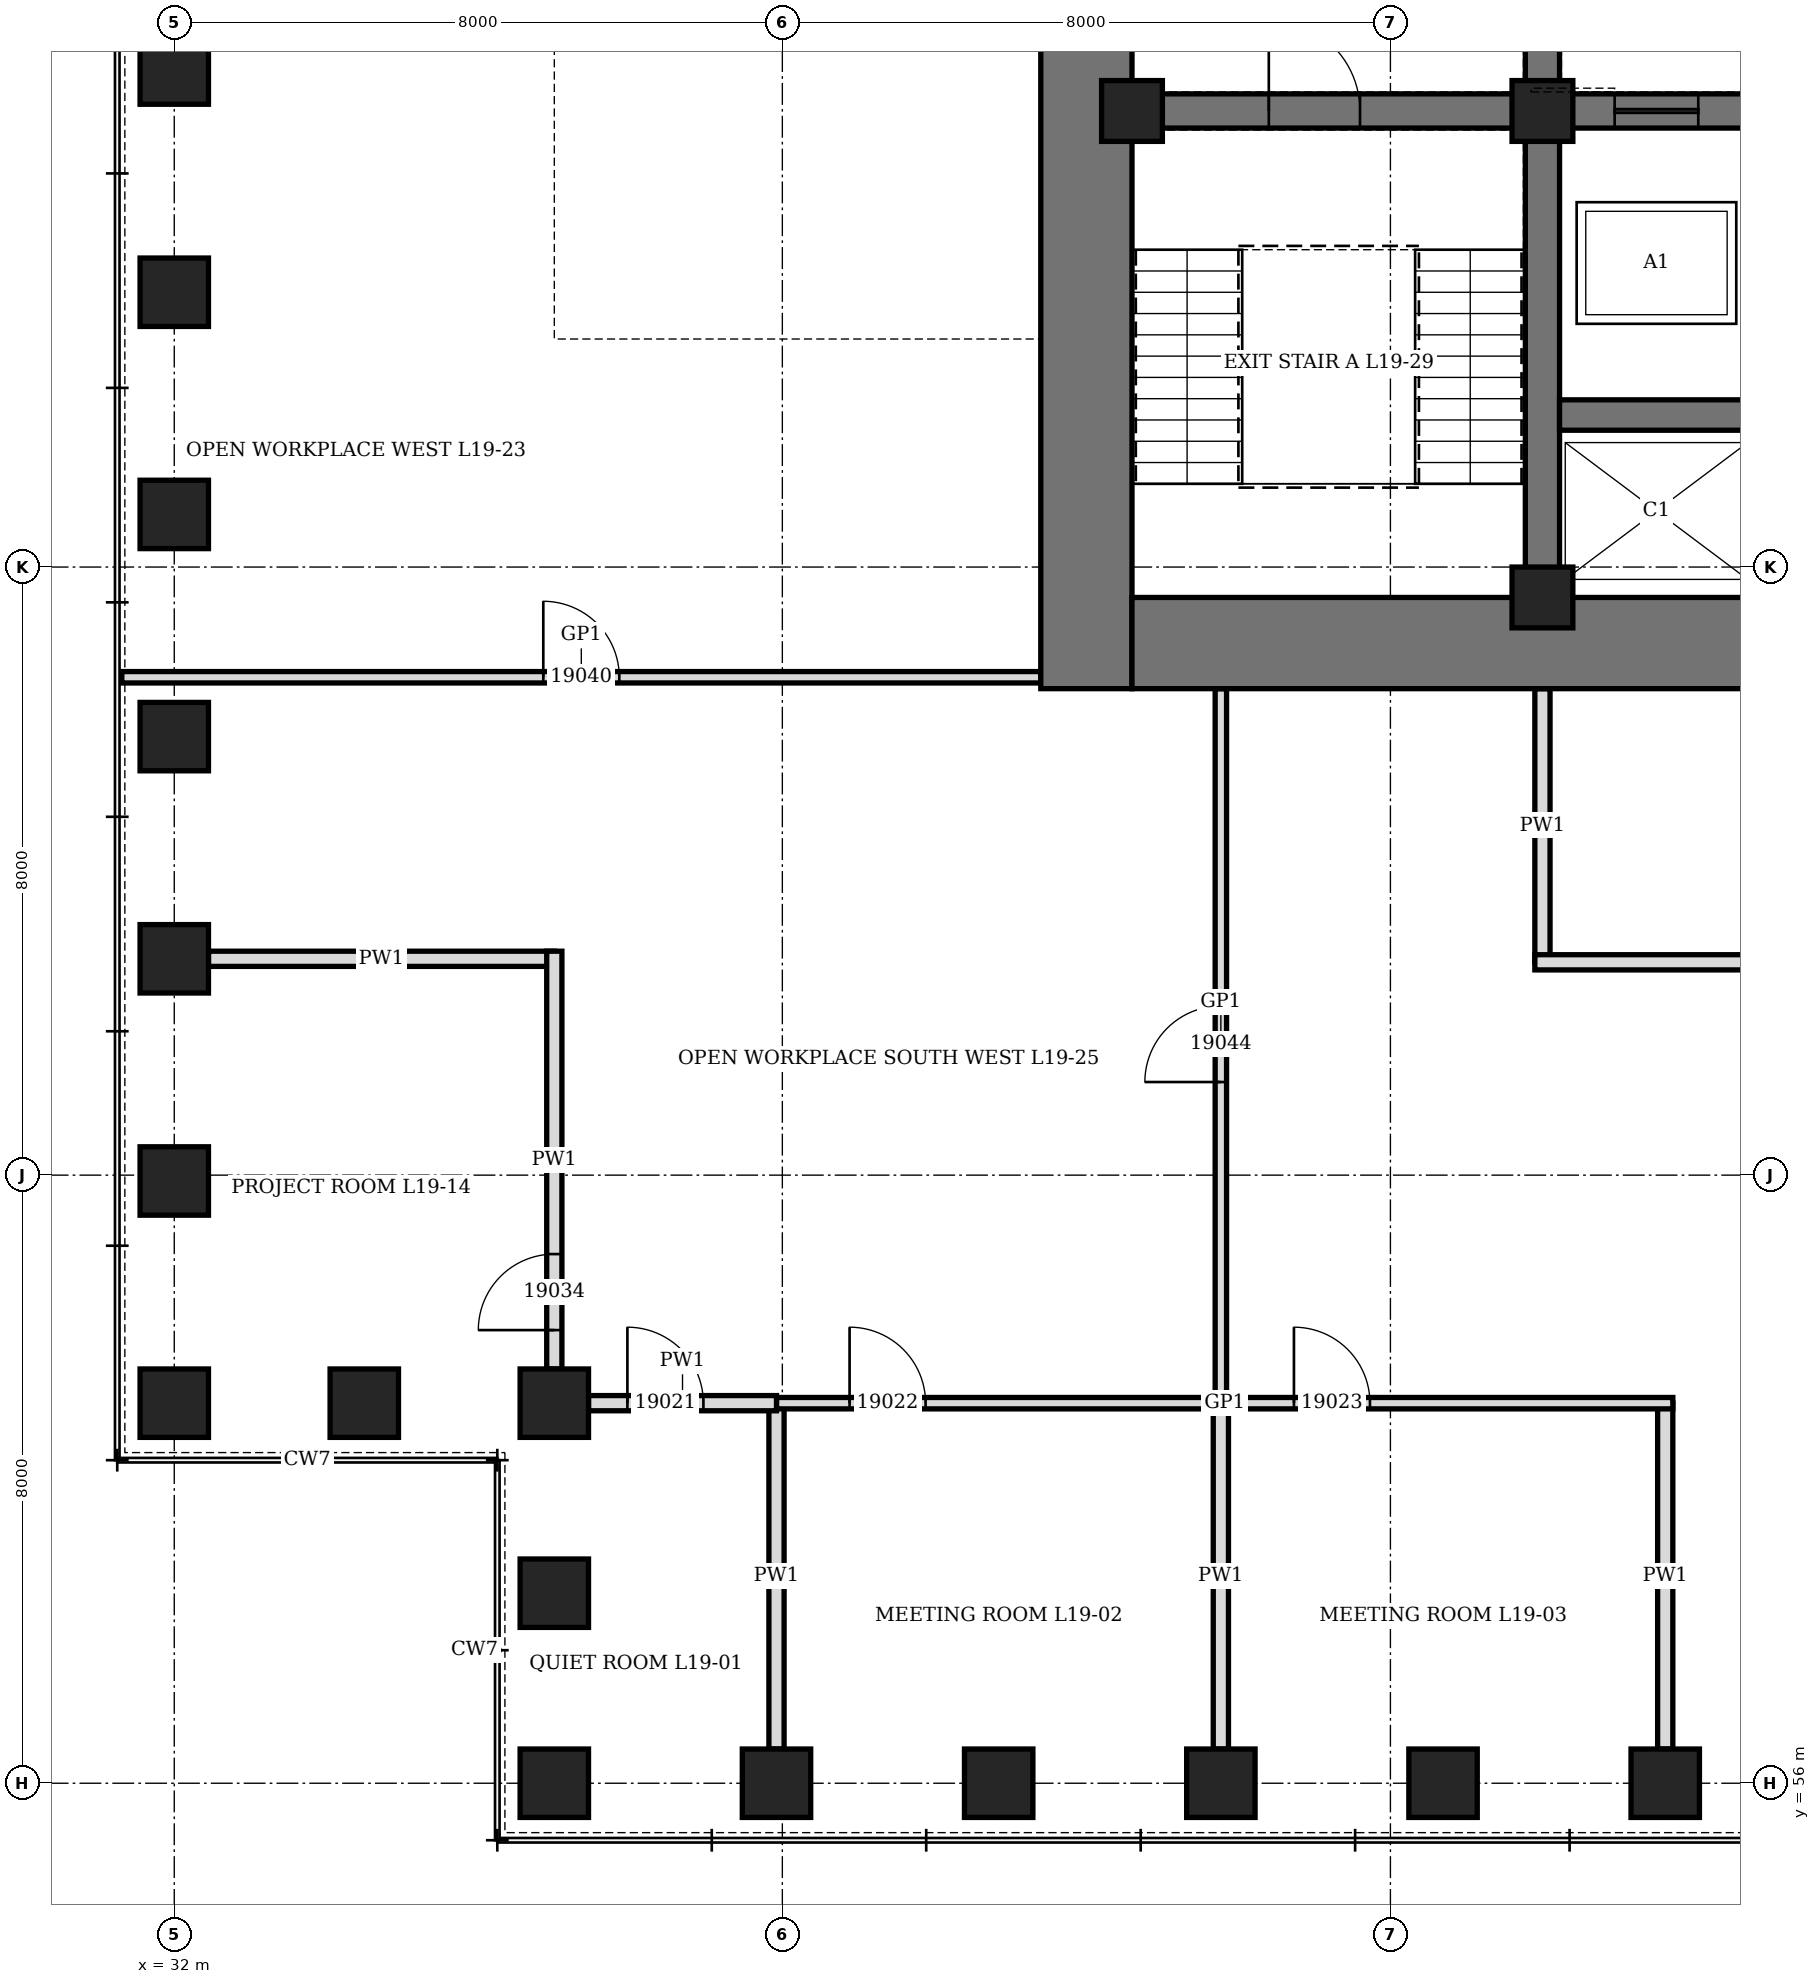
"""IFC4 building model, lengths in metres.
Left out: names, types, materials, properties, quantities, classifications, styles, units other than length and angle.
Written with IfcOpenShell. Run it as: python <this file> out.ifc"""

import sys

from ifc_helpers import new_model, si_unit, direction, frame, frame_2d, origin, origin_2d, place, context, subcontext, project, spatial, rectangle, hollow_rectangle, extrude, element, fill, save


model = new_model("IFC4")
c1 = context("Model", 3, precision=1e-05, world=origin(), true_north=direction((0.0, 1.0)))
c2 = subcontext(c1, "Body", "Model", "MODEL_VIEW")
j1 = project(units=[si_unit("LENGTHUNIT", "METRE"), si_unit("PLANEANGLEUNIT", "RADIAN")], contexts=[c1])
p1 = place(None, origin())
s1 = spatial("IfcSite", under=j1, at=p1, CompositionType="ELEMENT")
p2 = place(p1, origin())
s2 = spatial("IfcBuilding", under=s1, at=p2, CompositionType="ELEMENT")
p3 = place(p2, frame((0.0, 0.0, 89.5)))
s3 = spatial("IfcBuildingStorey", under=s2, at=p3, CompositionType="ELEMENT", Elevation=89.5)
for number, where, z_axis, x_axis in (
    (1, (37.0, 56.0, 0.0), (0.0, 0.0, 1.0), (1.0, 0.0, 0.0)),
    (2, (39.923, 56.0, 0.0), (0.0, 0.0, 1.0), (1.0, 0.0, 0.0)),
    (3, (42.846, 56.0, 0.0), (0.0, 0.0, 1.0), (1.0, 0.0, 0.0)),
    (4, (45.769, 56.0, 0.0), (0.0, 0.0, 1.0), (1.0, 0.0, 0.0)),
    (5, (48.692, 56.0, 0.0), (0.0, 0.0, 1.0), (1.0, 0.0, 0.0)),
    (6, (51.615, 56.0, 0.0), (0.0, 0.0, 1.0), (1.0, 0.0, 0.0)),
    (7, (32.0, 78.539, 0.0), (0.0, 0.0, 1.0), (0.0, 1.0, 0.0)),
    (8, (32.0, 75.615, 0.0), (0.0, 0.0, 1.0), (0.0, 1.0, 0.0)),
    (9, (32.0, 72.692, 0.0), (0.0, 0.0, 1.0), (0.0, 1.0, 0.0)),
    (10, (32.0, 69.769, 0.0), (0.0, 0.0, 1.0), (0.0, 1.0, 0.0)),
    (11, (32.0, 66.846, 0.0), (0.0, 0.0, 1.0), (0.0, 1.0, 0.0)),
    (12, (32.0, 63.923, 0.0), (0.0, 0.0, 1.0), (0.0, 1.0, 0.0)),
    (13, (32.0, 61.0, 0.0), (0.0, 0.0, 1.0), (1.0, 0.0, 0.0)),
    (14, (34.5, 61.0, 0.0), (0.0, 0.0, 1.0), (1.0, 0.0, 0.0)),
    (15, (37.0, 61.0, 0.0), (0.0, 0.0, 1.0), (0.0, 1.0, 0.0)),
    (16, (37.0, 58.5, 0.0), (0.0, 0.0, 1.0), (0.0, 1.0, 0.0)),
):
    element("IfcColumn", number, at=place(p3, frame(where, z_axis=z_axis, x_axis=x_axis)), inside=s3, PredefinedType="COLUMN", context=c2, shape_type="SweptSolid", body=[
        extrude(hollow_rectangle(XDim=0.9, YDim=0.9, WallThickness=0.12, at=origin_2d()), origin(), (0.0, 0.0, 1.0), 4.2),
    ])
p4 = place(p3, frame((44.0, 70.4, 0.0), z_axis=(0.0, 0.0, 1.0), x_axis=(0.0, 1.0, 0.0)))
e17 = element("IfcWall", 17, at=p4, inside=s3, PredefinedType="SHEAR", context=c2, shape_type="SweptSolid", body=[
    extrude(rectangle(XDim=19.2, YDim=1.2, at=frame_2d((9.6, 0.0))), origin(), (0.0, 0.0, 1.0), 4.2),
])
p5 = place(p4, frame((8.6, 0.0, 0.0)))
e18 = element("IfcOpeningElement", 18, at=p5, cuts=e17, PredefinedType="OPENING", context=c2, shape_type="SweptSolid", body=[
    extrude(rectangle(XDim=2.0, YDim=2.4, at=frame_2d((1.0, 1.2))), frame((0.0, 0.61, 0.0), z_axis=(0.0, -1.0, 0.0), x_axis=(1.0, 0.0, 0.0)), (0.0, 0.0, 1.0), 1.22),
])
p6 = place(p3, frame((44.6, 71.0, 0.0), z_axis=(0.0, 0.0, 1.0), x_axis=(1.0, 0.0, 0.0)))
e19 = element("IfcWall", 19, at=p6, inside=s3, PredefinedType="SHEAR", context=c2, shape_type="SweptSolid", body=[
    extrude(rectangle(XDim=22.8, YDim=1.2, at=frame_2d((11.4, 0.0))), origin(), (0.0, 0.0, 1.0), 4.2),
])
p7 = place(p3, frame((50.0, 71.6, 0.0), z_axis=(0.0, 0.0, 1.0), x_axis=(0.0, 1.0, 0.0)))
e20 = element("IfcWall", 20, at=p7, inside=s3, PredefinedType="SHEAR", context=c2, shape_type="SweptSolid", body=[
    extrude(rectangle(XDim=16.8, YDim=0.45, at=frame_2d((8.4, 0.0))), origin(), (0.0, 0.0, 1.0), 4.2),
])
p8 = place(p7, frame((7.5, 0.0, 0.0)))
e21 = element("IfcOpeningElement", 21, at=p8, cuts=e20, PredefinedType="OPENING", context=c2, shape_type="SweptSolid", body=[
    extrude(rectangle(XDim=1.8, YDim=2.4, at=frame_2d((0.9, 1.2))), frame((0.0, 0.235, 0.0), z_axis=(0.0, -1.0, 0.0), x_axis=(1.0, 0.0, 0.0)), (0.0, 0.0, 1.0), 0.47),
])
p9 = place(p3, frame((44.6, 78.0, 0.0), z_axis=(0.0, 0.0, 1.0), x_axis=(1.0, 0.0, 0.0)))
e22 = element("IfcWall", 22, at=p9, inside=s3, PredefinedType="SHEAR", context=c2, shape_type="SweptSolid", body=[
    extrude(rectangle(XDim=5.175, YDim=0.45, at=frame_2d((2.587, 0.0))), origin(), (0.0, 0.0, 1.0), 4.2),
])
p10 = place(p9, frame((1.8, 0.0, 0.0)))
e23 = element("IfcOpeningElement", 23, at=p10, cuts=e22, PredefinedType="OPENING", context=c2, shape_type="SweptSolid", body=[
    extrude(rectangle(XDim=1.2, YDim=2.1, at=frame_2d((0.6, 1.05))), frame((0.0, 0.235, 0.0), z_axis=(0.0, -1.0, 0.0), x_axis=(1.0, 0.0, 0.0)), (0.0, 0.0, 1.0), 0.47),
])
p11 = place(p3, frame((50.225, 78.0, 0.0), z_axis=(0.0, 0.0, 1.0), x_axis=(1.0, 0.0, 0.0)))
e24 = element("IfcWall", 24, at=p11, inside=s3, PredefinedType="SHEAR", context=c2, shape_type="SweptSolid", body=[
    extrude(rectangle(XDim=11.55, YDim=0.45, at=frame_2d((5.775, 0.0))), origin(), (0.0, 0.0, 1.0), 4.2),
])
p12 = place(p11, frame((0.725, 0.0, 0.0)))
e25 = element("IfcOpeningElement", 25, at=p12, cuts=e24, PredefinedType="OPENING", context=c2, shape_type="SweptSolid", body=[
    extrude(rectangle(XDim=1.1, YDim=2.2, at=frame_2d((0.55, 1.1))), frame((0.0, 0.235, 0.0), z_axis=(0.0, -1.0, 0.0), x_axis=(1.0, 0.0, 0.0)), (0.0, 0.0, 1.0), 0.47),
])
p13 = place(p11, frame((3.725, 0.0, 0.0)))
e26 = element("IfcOpeningElement", 26, at=p13, cuts=e24, PredefinedType="OPENING", context=c2, shape_type="SweptSolid", body=[
    extrude(rectangle(XDim=1.1, YDim=2.2, at=frame_2d((0.55, 1.1))), frame((0.0, 0.235, 0.0), z_axis=(0.0, -1.0, 0.0), x_axis=(1.0, 0.0, 0.0)), (0.0, 0.0, 1.0), 0.47),
])
p14 = place(p11, frame((6.725, 0.0, 0.0)))
e27 = element("IfcOpeningElement", 27, at=p14, cuts=e24, PredefinedType="OPENING", context=c2, shape_type="SweptSolid", body=[
    extrude(rectangle(XDim=1.1, YDim=2.2, at=frame_2d((0.55, 1.1))), frame((0.0, 0.235, 0.0), z_axis=(0.0, -1.0, 0.0), x_axis=(1.0, 0.0, 0.0)), (0.0, 0.0, 1.0), 0.47),
])
p15 = place(p11, frame((9.725, 0.0, 0.0)))
e28 = element("IfcOpeningElement", 28, at=p15, cuts=e24, PredefinedType="OPENING", context=c2, shape_type="SweptSolid", body=[
    extrude(rectangle(XDim=1.1, YDim=2.2, at=frame_2d((0.55, 1.1))), frame((0.0, 0.235, 0.0), z_axis=(0.0, -1.0, 0.0), x_axis=(1.0, 0.0, 0.0)), (0.0, 0.0, 1.0), 0.47),
])
p16 = place(p3, frame((50.225, 74.0, 0.0), z_axis=(0.0, 0.0, 1.0), x_axis=(1.0, 0.0, 0.0)))
e29 = element("IfcWall", 29, at=p16, inside=s3, PredefinedType="SHEAR", context=c2, shape_type="SweptSolid", body=[
    extrude(rectangle(XDim=11.55, YDim=0.4, at=frame_2d((5.775, 0.0))), origin(), (0.0, 0.0, 1.0), 4.2),
])
for number, where, z_axis, x_axis in (
    (30, (44.6, 78.0, 0.0), (0.0, 0.0, 1.0), (1.0, 0.0, 0.0)),
    (31, (50.0, 71.6, 0.0), (0.0, 0.0, 1.0), (1.0, 0.0, 0.0)),
    (32, (50.0, 78.0, 0.0), (0.0, 0.0, 1.0), (1.0, 0.0, 0.0)),
):
    element("IfcColumn", number, at=place(p3, frame(where, z_axis=z_axis, x_axis=x_axis)), inside=s3, PredefinedType="COLUMN", context=c2, shape_type="SweptSolid", body=[
        extrude(hollow_rectangle(XDim=0.8, YDim=0.8, WallThickness=0.1, at=origin_2d()), origin(), (0.0, 0.0, 1.0), 4.2),
    ])
p17 = place(p3, frame((39.923, 56.45, 0.0), z_axis=(0.0, 0.0, 1.0), x_axis=(0.0, 1.0, 0.0)))
e33 = element("IfcWall", 33, at=p17, inside=s3, PredefinedType="PARTITIONING", context=c2, shape_type="SweptSolid", body=[
    extrude(rectangle(XDim=4.55, YDim=0.2, at=frame_2d((2.275, 0.0))), origin(), (0.0, 0.0, 1.0), 3.428),
])
for number, where, z_axis, x_axis in (
    (34, (45.769, 56.45, 0.0), (0.0, 0.0, 1.0), (0.0, 1.0, 0.0)),
    (35, (51.615, 56.45, 0.0), (0.0, 0.0, 1.0), (0.0, 1.0, 0.0)),
):
    element("IfcWall", number, at=place(p3, frame(where, z_axis=z_axis, x_axis=x_axis)), inside=s3, PredefinedType="PARTITIONING", context=c2, shape_type="SweptSolid", body=[
        extrude(rectangle(XDim=4.55, YDim=0.2, at=frame_2d((2.275, 0.0))), origin(), (0.0, 0.0, 1.0), 3.278),
    ])
p18 = place(p3, frame((32.45, 66.846, 0.0), z_axis=(0.0, 0.0, 1.0), x_axis=(1.0, 0.0, 0.0)))
e36 = element("IfcWall", 36, at=p18, inside=s3, PredefinedType="PARTITIONING", context=c2, shape_type="SweptSolid", body=[
    extrude(rectangle(XDim=4.55, YDim=0.2, at=frame_2d((2.275, 0.0))), origin(), (0.0, 0.0, 1.0), 3.428),
])
p19 = place(p3, frame((50.0, 66.8, 0.0), z_axis=(0.0, 0.0, 1.0), x_axis=(0.0, 1.0, 0.0)))
e37 = element("IfcWall", 37, at=p19, inside=s3, PredefinedType="PARTITIONING", context=c2, shape_type="SweptSolid", body=[
    extrude(rectangle(XDim=3.6, YDim=0.2, at=frame_2d((1.8, 0.0))), origin(), (0.0, 0.0, 1.0), 4.04),
])
p20 = place(p3, frame((39.923, 61.0, 0.0), z_axis=(0.0, 0.0, 1.0), x_axis=(1.0, 0.0, 0.0)))
e38 = element("IfcWall", 38, at=p20, inside=s3, PredefinedType="PARTITIONING", context=c2, shape_type="SweptSolid", body=[
    extrude(rectangle(XDim=11.792, YDim=0.15, at=frame_2d((5.896, 0.0))), origin(), (0.0, 0.0, 1.0), 4.04),
])
p21 = place(p20, frame((0.961, 0.0, 0.0)))
e39 = element("IfcOpeningElement", 39, at=p21, cuts=e38, PredefinedType="OPENING", context=c2, shape_type="SweptSolid", body=[
    extrude(rectangle(XDim=1.0, YDim=2.4, at=frame_2d((0.5, 1.2))), frame((0.0, 0.085, 0.0), z_axis=(0.0, -1.0, 0.0), x_axis=(1.0, 0.0, 0.0)), (0.0, 0.0, 1.0), 0.17),
])
p22 = place(p20, frame((6.808, 0.0, 0.0)))
e40 = element("IfcOpeningElement", 40, at=p22, cuts=e38, PredefinedType="OPENING", context=c2, shape_type="SweptSolid", body=[
    extrude(rectangle(XDim=1.0, YDim=2.4, at=frame_2d((0.5, 1.2))), frame((0.0, 0.085, 0.0), z_axis=(0.0, -1.0, 0.0), x_axis=(1.0, 0.0, 0.0)), (0.0, 0.0, 1.0), 0.17),
])
p23 = place(p3, frame((37.45, 61.0, 0.0), z_axis=(0.0, 0.0, 1.0), x_axis=(1.0, 0.0, 0.0)))
e41 = element("IfcWall", 41, at=p23, inside=s3, PredefinedType="PARTITIONING", context=c2, shape_type="SweptSolid", body=[
    extrude(rectangle(XDim=2.473, YDim=0.2, at=frame_2d((1.237, 0.0))), origin(), (0.0, 0.0, 1.0), 4.04),
])
p24 = place(p23, frame((0.511, 0.0, 0.0)))
e42 = element("IfcOpeningElement", 42, at=p24, cuts=e41, PredefinedType="OPENING", context=c2, shape_type="SweptSolid", body=[
    extrude(rectangle(XDim=1.0, YDim=2.1, at=frame_2d((0.5, 1.05))), frame((0.0, 0.11, 0.0), z_axis=(0.0, -1.0, 0.0), x_axis=(1.0, 0.0, 0.0)), (0.0, 0.0, 1.0), 0.22),
])
p25 = place(p3, frame((49.9, 66.8, 0.0), z_axis=(0.0, 0.0, 1.0), x_axis=(1.0, 0.0, 0.0)))
e43 = element("IfcWall", 43, at=p25, inside=s3, PredefinedType="PARTITIONING", context=c2, shape_type="SweptSolid", body=[
    extrude(rectangle(XDim=12.2, YDim=0.2, at=frame_2d((6.1, 0.0))), origin(), (0.0, 0.0, 1.0), 4.04),
])
p26 = place(p25, frame((5.6, 0.0, 0.0)))
e44 = element("IfcOpeningElement", 44, at=p26, cuts=e43, PredefinedType="OPENING", context=c2, shape_type="SweptSolid", body=[
    extrude(rectangle(XDim=1.0, YDim=2.1, at=frame_2d((0.5, 1.05))), frame((0.0, 0.11, 0.0), z_axis=(0.0, -1.0, 0.0), x_axis=(1.0, 0.0, 0.0)), (0.0, 0.0, 1.0), 0.22),
])
p27 = place(p3, frame((31.31, 70.55, 0.0), z_axis=(0.0, 0.0, 1.0), x_axis=(1.0, 0.0, 0.0)))
e45 = element("IfcWall", 45, at=p27, inside=s3, PredefinedType="PARTITIONING", context=c2, shape_type="SweptSolid", body=[
    extrude(rectangle(XDim=12.09, YDim=0.15, at=frame_2d((6.045, 0.0))), origin(), (0.0, 0.0, 1.0), 4.04),
])
p28 = place(p27, frame((5.545, 0.0, 0.0)))
e46 = element("IfcOpeningElement", 46, at=p28, cuts=e45, PredefinedType="OPENING", context=c2, shape_type="SweptSolid", body=[
    extrude(rectangle(XDim=1.0, YDim=2.4, at=frame_2d((0.5, 1.2))), frame((0.0, 0.085, 0.0), z_axis=(0.0, -1.0, 0.0), x_axis=(1.0, 0.0, 0.0)), (0.0, 0.0, 1.0), 0.17),
])
p29 = place(p3, frame((37.0, 61.45, 0.0), z_axis=(0.0, 0.0, 1.0), x_axis=(0.0, 1.0, 0.0)))
e47 = element("IfcWall", 47, at=p29, inside=s3, PredefinedType="PARTITIONING", context=c2, shape_type="SweptSolid", body=[
    extrude(rectangle(XDim=5.496, YDim=0.2, at=frame_2d((2.748, 0.0))), origin(), (0.0, 0.0, 1.0), 4.04),
])
p30 = place(p29, frame((0.511, 0.0, 0.0)))
e48 = element("IfcOpeningElement", 48, at=p30, cuts=e47, PredefinedType="OPENING", context=c2, shape_type="SweptSolid", body=[
    extrude(rectangle(XDim=1.0, YDim=2.1, at=frame_2d((0.5, 1.05))), frame((0.0, 0.11, 0.0), z_axis=(0.0, -1.0, 0.0), x_axis=(1.0, 0.0, 0.0)), (0.0, 0.0, 1.0), 0.22),
])
p31 = place(p3, frame((45.769, 61.05, 0.0), z_axis=(0.0, 0.0, 1.0), x_axis=(0.0, 1.0, 0.0)))
e49 = element("IfcWall", 49, at=p31, inside=s3, PredefinedType="PARTITIONING", context=c2, shape_type="SweptSolid", body=[
    extrude(rectangle(XDim=9.35, YDim=0.15, at=frame_2d((4.675, 0.0))), origin(), (0.0, 0.0, 1.0), 3.278),
])
p32 = place(p31, frame((4.175, 0.0, 0.0)))
e50 = element("IfcOpeningElement", 50, at=p32, cuts=e49, PredefinedType="OPENING", context=c2, shape_type="SweptSolid", body=[
    extrude(rectangle(XDim=1.0, YDim=2.4, at=frame_2d((0.5, 1.2))), frame((0.0, 0.085, 0.0), z_axis=(0.0, -1.0, 0.0), x_axis=(1.0, 0.0, 0.0)), (0.0, 0.0, 1.0), 0.17),
])
p33 = place(p10, origin())
e51 = element("IfcDoor", 51, at=p33, inside=s3, OperationType="SINGLE_SWING_LEFT", PredefinedType="DOOR", context=c2, shape_type="SweptSolid", body=[
    extrude(rectangle(XDim=1.2, YDim=2.1, at=frame_2d((0.6, 1.05))), frame((0.0, 0.225, 0.0), z_axis=(0.0, -1.0, 0.0), x_axis=(1.0, 0.0, 0.0)), (0.0, 0.0, 1.0), 0.449),
])
fill(e23, e51)
p34 = place(p12, origin())
e52 = element("IfcDoor", 52, at=p34, inside=s3, OperationType="SLIDING_TO_LEFT", PredefinedType="DOOR", context=c2, shape_type="SweptSolid", body=[
    extrude(rectangle(XDim=1.1, YDim=2.2, at=frame_2d((0.55, 1.1))), frame((0.0, 0.225, 0.0), z_axis=(0.0, -1.0, 0.0), x_axis=(1.0, 0.0, 0.0)), (0.0, 0.0, 1.0), 0.449),
])
fill(e25, e52)
p35 = place(p24, origin())
e53 = element("IfcDoor", 53, at=p35, inside=s3, OperationType="SINGLE_SWING_LEFT", PredefinedType="DOOR", context=c2, shape_type="SweptSolid", body=[
    extrude(rectangle(XDim=1.0, YDim=2.1, at=frame_2d((0.5, 1.05))), frame((0.0, 0.1, 0.0), z_axis=(0.0, -1.0, 0.0), x_axis=(1.0, 0.0, 0.0)), (0.0, 0.0, 1.0), 0.199),
])
fill(e42, e53)
p36 = place(p21, origin())
e54 = element("IfcDoor", 54, at=p36, inside=s3, OperationType="SINGLE_SWING_RIGHT", PredefinedType="DOOR", context=c2, shape_type="SweptSolid", body=[
    extrude(rectangle(XDim=1.0, YDim=2.4, at=frame_2d((0.5, 1.2))), frame((0.0, 0.075, 0.0), z_axis=(0.0, -1.0, 0.0), x_axis=(1.0, 0.0, 0.0)), (0.0, 0.0, 1.0), 0.149),
])
fill(e39, e54)
p37 = place(p22, origin())
e55 = element("IfcDoor", 55, at=p37, inside=s3, OperationType="SINGLE_SWING_RIGHT", PredefinedType="DOOR", context=c2, shape_type="SweptSolid", body=[
    extrude(rectangle(XDim=1.0, YDim=2.4, at=frame_2d((0.5, 1.2))), frame((0.0, 0.075, 0.0), z_axis=(0.0, -1.0, 0.0), x_axis=(1.0, 0.0, 0.0)), (0.0, 0.0, 1.0), 0.149),
])
fill(e40, e55)
p38 = place(p30, origin())
e56 = element("IfcDoor", 56, at=p38, inside=s3, OperationType="SINGLE_SWING_LEFT", PredefinedType="DOOR", context=c2, shape_type="SweptSolid", body=[
    extrude(rectangle(XDim=1.0, YDim=2.1, at=frame_2d((0.5, 1.05))), frame((0.0, 0.1, 0.0), z_axis=(0.0, -1.0, 0.0), x_axis=(1.0, 0.0, 0.0)), (0.0, 0.0, 1.0), 0.199),
])
fill(e48, e56)
p39 = place(p28, origin())
e57 = element("IfcDoor", 57, at=p39, inside=s3, OperationType="SINGLE_SWING_RIGHT", PredefinedType="DOOR", context=c2, shape_type="SweptSolid", body=[
    extrude(rectangle(XDim=1.0, YDim=2.4, at=frame_2d((0.5, 1.2))), frame((0.0, 0.075, 0.0), z_axis=(0.0, -1.0, 0.0), x_axis=(1.0, 0.0, 0.0)), (0.0, 0.0, 1.0), 0.149),
])
fill(e46, e57)
p40 = place(p32, origin())
e58 = element("IfcDoor", 58, at=p40, inside=s3, OperationType="SINGLE_SWING_RIGHT", PredefinedType="DOOR", context=c2, shape_type="SweptSolid", body=[
    extrude(rectangle(XDim=1.0, YDim=2.4, at=frame_2d((0.5, 1.2))), frame((0.0, 0.075, 0.0), z_axis=(0.0, -1.0, 0.0), x_axis=(1.0, 0.0, 0.0)), (0.0, 0.0, 1.0), 0.149),
])
fill(e50, e58)
save(model, sys.argv[1])
